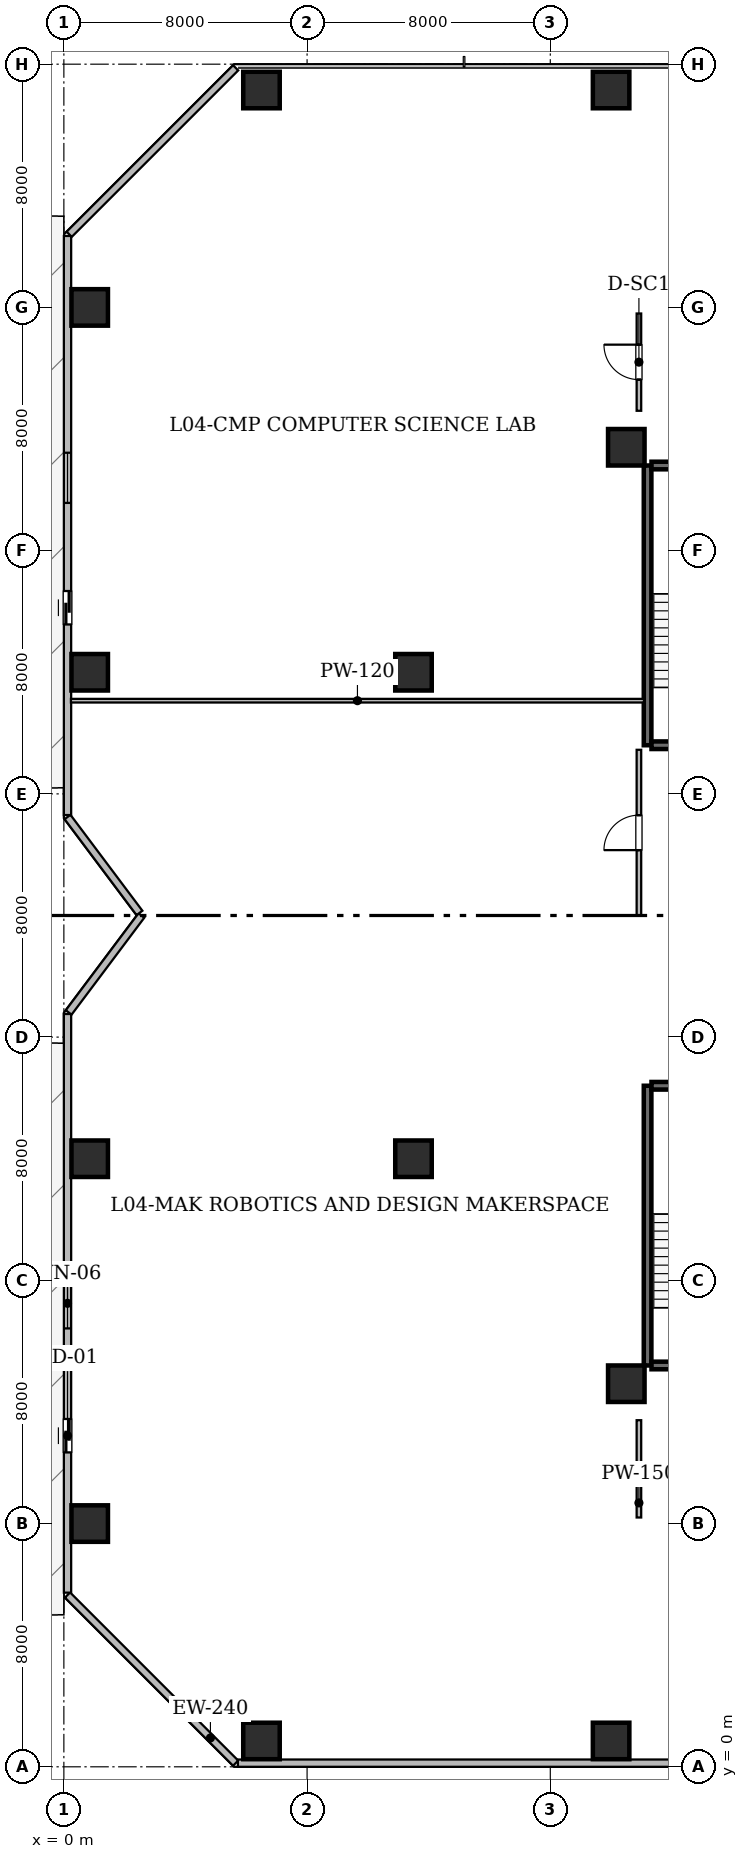
"""IFC4 building model, lengths in metres.
Left out: names, types, materials, properties, quantities, classifications, styles, units other than length and angle.
Written with IfcOpenShell. Run it as: python <this file> out.ifc"""

import sys

from ifc_helpers import new_model, si_unit, direction, frame, frame_2d, origin, origin_2d, place, context, subcontext, project, spatial, rectangle, hollow_rectangle, extrude, element, fill, save


model = new_model("IFC4")
c1 = context("Model", 3, precision=1e-05, world=origin(), true_north=direction((0.0, 1.0)))
c2 = subcontext(c1, "Body", "Model", "MODEL_VIEW")
j1 = project(units=[si_unit("LENGTHUNIT", "METRE"), si_unit("PLANEANGLEUNIT", "RADIAN")], contexts=[c1])
p1 = place(None, origin())
s1 = spatial("IfcSite", under=j1, at=p1, CompositionType="ELEMENT")
p2 = place(p1, origin())
s2 = spatial("IfcBuilding", under=s1, at=p2, CompositionType="ELEMENT")
p3 = place(p2, frame((0.0, 0.0, 20.4)))
s3 = spatial("IfcBuildingStorey", under=s2, at=p3, CompositionType="ELEMENT", Elevation=20.4)
for number, where, z_axis, x_axis in (
    (1, (6.5, 0.85, 0.0), (0.0, 0.0, 1.0), (1.0, 0.0, 0.0)),
    (2, (18.0, 0.85, 0.0), (0.0, 0.0, 1.0), (1.0, 0.0, 0.0)),
    (3, (6.5, 55.15, 0.0), (0.0, 0.0, 1.0), (1.0, 0.0, 0.0)),
    (4, (18.0, 55.15, 0.0), (0.0, 0.0, 1.0), (1.0, 0.0, 0.0)),
    (5, (0.85, 8.0, 0.0), (0.0, 0.0, 1.0), (1.0, 0.0, 0.0)),
    (6, (0.85, 20.0, 0.0), (0.0, 0.0, 1.0), (1.0, 0.0, 0.0)),
    (7, (0.85, 36.0, 0.0), (0.0, 0.0, 1.0), (1.0, 0.0, 0.0)),
    (8, (0.85, 48.0, 0.0), (0.0, 0.0, 1.0), (1.0, 0.0, 0.0)),
    (9, (18.5, 12.6, 0.0), (0.0, 0.0, 1.0), (1.0, 0.0, 0.0)),
    (10, (18.5, 43.4, 0.0), (0.0, 0.0, 1.0), (1.0, 0.0, 0.0)),
    (11, (11.5, 20.0, 0.0), (0.0, 0.0, 1.0), (1.0, 0.0, 0.0)),
    (12, (11.5, 36.0, 0.0), (0.0, 0.0, 1.0), (1.0, 0.0, 0.0)),
):
    element("IfcColumn", number, at=place(p3, frame(where, z_axis=z_axis, x_axis=x_axis)), inside=s3, PredefinedType="COLUMN", context=c2, shape_type="SweptSolid", body=[
        extrude(hollow_rectangle(XDim=1.2, YDim=1.2, WallThickness=0.06, at=origin_2d()), origin(), (0.0, 0.0, 1.0), 4.2),
    ])
p4 = place(p3, frame((5.65, 0.12, 0.0), z_axis=(0.0, 0.0, 1.0), x_axis=(-0.707106781187, 0.707106781187, 0.0)))
e13 = element("IfcWall", 13, at=p4, inside=s3, PredefinedType="STANDARD", context=c2, shape_type="SweptSolid", body=[
    extrude(rectangle(XDim=7.82, YDim=0.24, at=frame_2d((3.91, 0.0))), origin(), (0.0, 0.0, 1.0), 3.92),
])
p5 = place(p3, frame((0.12, 5.728, 0.0), z_axis=(0.0, 0.0, 1.0), x_axis=(0.0, 1.0, 0.0)))
e14 = element("IfcWall", 14, at=p5, inside=s3, PredefinedType="STANDARD", context=c2, shape_type="SweptSolid", body=[
    extrude(rectangle(XDim=19.032, YDim=0.24, at=frame_2d((9.516, 0.0))), origin(), (0.0, 0.0, 1.0), 3.92),
])
p6 = place(p5, frame((4.612, 0.0, 0.0)))
e15 = element("IfcOpeningElement", 15, at=p6, cuts=e14, PredefinedType="OPENING", context=c2, shape_type="SweptSolid", body=[
    extrude(rectangle(XDim=1.1, YDim=2.2, at=frame_2d((0.55, 1.1))), frame((0.0, 0.13, 0.0), z_axis=(0.0, -1.0, 0.0), x_axis=(1.0, 0.0, 0.0)), (0.0, 0.0, 1.0), 0.26),
])
p7 = place(p5, frame((8.691, 0.0, 0.85)))
e16 = element("IfcOpeningElement", 16, at=p7, cuts=e14, PredefinedType="OPENING", context=c2, shape_type="SweptSolid", body=[
    extrude(rectangle(XDim=1.65, YDim=1.55, at=frame_2d((0.825, 0.775))), frame((0.0, 0.13, 0.0), z_axis=(0.0, -1.0, 0.0), x_axis=(1.0, 0.0, 0.0)), (0.0, 0.0, 1.0), 0.26),
])
p8 = place(p3, frame((0.158, 24.811, 0.0), z_axis=(0.0, 0.0, 1.0), x_axis=(0.600058791648, 0.799955902889, 0.0)))
e17 = element("IfcWall", 17, at=p8, inside=s3, PredefinedType="STANDARD", context=c2, shape_type="SweptSolid", body=[
    extrude(rectangle(XDim=3.986, YDim=0.24, at=frame_2d((1.993, 0.0))), origin(), (0.0, 0.0, 1.0), 3.92),
])
p9 = place(p3, frame((2.487, 28.084, 0.0), z_axis=(0.0, 0.0, 1.0), x_axis=(-0.599990098106, 0.800007426325, 0.0)))
e18 = element("IfcWall", 18, at=p9, inside=s3, PredefinedType="STANDARD", context=c2, shape_type="SweptSolid", body=[
    extrude(rectangle(XDim=3.945, YDim=0.24, at=frame_2d((1.973, 0.0))), origin(), (0.0, 0.0, 1.0), 3.92),
])
p10 = place(p3, frame((0.12, 31.304, 0.0), z_axis=(0.0, 0.0, 1.0), x_axis=(0.0, 1.0, 0.0)))
e19 = element("IfcWall", 19, at=p10, inside=s3, PredefinedType="STANDARD", context=c2, shape_type="SweptSolid", body=[
    extrude(rectangle(XDim=19.046, YDim=0.24, at=frame_2d((9.523, 0.0))), origin(), (0.0, 0.0, 1.0), 3.92),
])
p11 = place(p10, frame((6.268, 0.0, 0.0)))
e20 = element("IfcOpeningElement", 20, at=p11, cuts=e19, PredefinedType="OPENING", context=c2, shape_type="SweptSolid", body=[
    extrude(rectangle(XDim=1.1, YDim=2.2, at=frame_2d((0.55, 1.1))), frame((0.0, 0.13, 0.0), z_axis=(0.0, -1.0, 0.0), x_axis=(1.0, 0.0, 0.0)), (0.0, 0.0, 1.0), 0.26),
])
p12 = place(p10, frame((10.266, 0.0, 0.85)))
e21 = element("IfcOpeningElement", 21, at=p12, cuts=e19, PredefinedType="OPENING", context=c2, shape_type="SweptSolid", body=[
    extrude(rectangle(XDim=1.65, YDim=1.55, at=frame_2d((0.825, 0.775))), frame((0.0, 0.13, 0.0), z_axis=(0.0, -1.0, 0.0), x_axis=(1.0, 0.0, 0.0)), (0.0, 0.0, 1.0), 0.26),
])
p13 = place(p3, frame((0.175, 50.405, 0.0), z_axis=(0.0, 0.0, 1.0), x_axis=(0.707106781187, 0.707106781187, 0.0)))
e22 = element("IfcWall", 22, at=p13, inside=s3, PredefinedType="STANDARD", context=c2, shape_type="SweptSolid", body=[
    extrude(rectangle(XDim=7.743, YDim=0.24, at=frame_2d((3.871, 0.0))), origin(), (0.0, 0.0, 1.0), 3.92),
])
p14 = place(p3, frame((50.275, 0.12, 0.0), z_axis=(0.0, 0.0, 1.0), x_axis=(-1.0, 0.0, 0.0)))
e23 = element("IfcWall", 23, at=p14, inside=s3, PredefinedType="STANDARD", context=c2, shape_type="SweptSolid", body=[
    extrude(rectangle(XDim=44.55, YDim=0.24, at=frame_2d((22.275, 0.0))), origin(), (0.0, 0.0, 1.0), 3.92),
])
p15 = place(p14, frame((15.35, 0.0, 0.85)))
e24 = element("IfcOpeningElement", 24, at=p15, cuts=e23, PredefinedType="OPENING", context=c2, shape_type="SweptSolid", body=[
    extrude(rectangle(XDim=1.65, YDim=1.55, at=frame_2d((0.825, 0.775))), frame((0.0, 0.13, 0.0), z_axis=(0.0, -1.0, 0.0), x_axis=(1.0, 0.0, 0.0)), (0.0, 0.0, 1.0), 0.26),
])
p16 = place(p3, frame((19.2, 13.2, 0.0), z_axis=(0.0, 0.0, 1.0), x_axis=(0.0, 1.0, 0.0)))
e25 = element("IfcWall", 25, at=p16, inside=s3, PredefinedType="SHEAR", context=c2, shape_type="SweptSolid", body=[
    extrude(rectangle(XDim=9.2, YDim=0.25, at=frame_2d((4.6, 0.0))), origin(), (0.0, 0.0, 1.0), 3.92),
])
for number, where, z_axis, x_axis in (
    (26, (19.329, 13.2, 0.0), (0.0, 0.0, 1.0), (1.0, 0.0, 0.0)),
    (27, (19.329, 22.4, 0.0), (0.0, 0.0, 1.0), (1.0, 0.0, 0.0)),
):
    element("IfcWall", number, at=place(p3, frame(where, z_axis=z_axis, x_axis=x_axis)), inside=s3, PredefinedType="SHEAR", context=c2, shape_type="SweptSolid", body=[
        extrude(rectangle(XDim=3.692, YDim=0.25, at=frame_2d((1.846, 0.0))), origin(), (0.0, 0.0, 1.0), 3.92),
    ])
p17 = place(p3, frame((19.2, 33.6, 0.0), z_axis=(0.0, 0.0, 1.0), x_axis=(0.0, 1.0, 0.0)))
e28 = element("IfcWall", 28, at=p17, inside=s3, PredefinedType="SHEAR", context=c2, shape_type="SweptSolid", body=[
    extrude(rectangle(XDim=9.2, YDim=0.25, at=frame_2d((4.6, 0.0))), origin(), (0.0, 0.0, 1.0), 3.92),
])
for number, where, z_axis, x_axis in (
    (29, (19.329, 33.6, 0.0), (0.0, 0.0, 1.0), (1.0, 0.0, 0.0)),
    (30, (19.329, 42.8, 0.0), (0.0, 0.0, 1.0), (1.0, 0.0, 0.0)),
):
    element("IfcWall", number, at=place(p3, frame(where, z_axis=z_axis, x_axis=x_axis)), inside=s3, PredefinedType="SHEAR", context=c2, shape_type="SweptSolid", body=[
        extrude(rectangle(XDim=3.692, YDim=0.25, at=frame_2d((1.846, 0.0))), origin(), (0.0, 0.0, 1.0), 3.92),
    ])
p18 = place(p3, frame((18.915, 28.0, 0.0), z_axis=(0.0, 0.0, 1.0), x_axis=(0.0, 1.0, 0.0)))
e31 = element("IfcWall", 31, at=p18, inside=s3, PredefinedType="STANDARD", context=c2, shape_type="SweptSolid", body=[
    extrude(rectangle(XDim=5.45, YDim=0.15, at=frame_2d((2.725, 0.0))), origin(), (0.0, 0.0, 1.0), 3.92),
])
p19 = place(p18, frame((2.15, 0.0, 0.0)))
e32 = element("IfcOpeningElement", 32, at=p19, cuts=e31, PredefinedType="OPENING", context=c2, shape_type="SweptSolid", body=[
    extrude(rectangle(XDim=1.15, YDim=2.2, at=frame_2d((0.575, 1.1))), frame((0.0, 0.085, 0.0), z_axis=(0.0, -1.0, 0.0), x_axis=(1.0, 0.0, 0.0)), (0.0, 0.0, 1.0), 0.17),
])
p20 = place(p3, frame((18.915, 8.2, 0.0), z_axis=(0.0, 0.0, 1.0), x_axis=(0.0, 1.0, 0.0)))
e33 = element("IfcWall", 33, at=p20, inside=s3, PredefinedType="STANDARD", context=c2, shape_type="SweptSolid", body=[
    extrude(rectangle(XDim=3.2, YDim=0.15, at=frame_2d((1.6, 0.0))), origin(), (0.0, 0.0, 1.0), 3.92),
])
p21 = place(p3, frame((18.915, 44.6, 0.0), z_axis=(0.0, 0.0, 1.0), x_axis=(0.0, 1.0, 0.0)))
e34 = element("IfcWall", 34, at=p21, inside=s3, PredefinedType="STANDARD", context=c2, shape_type="SweptSolid", body=[
    extrude(rectangle(XDim=3.2, YDim=0.15, at=frame_2d((1.6, 0.0))), origin(), (0.0, 0.0, 1.0), 3.92),
])
p22 = place(p21, frame((1.025, 0.0, 0.0)))
e35 = element("IfcOpeningElement", 35, at=p22, cuts=e34, PredefinedType="OPENING", context=c2, shape_type="SweptSolid", body=[
    extrude(rectangle(XDim=1.15, YDim=2.2, at=frame_2d((0.575, 1.1))), frame((0.0, 0.085, 0.0), z_axis=(0.0, -1.0, 0.0), x_axis=(1.0, 0.0, 0.0)), (0.0, 0.0, 1.0), 0.17),
])
p23 = place(p3, frame((0.232, 35.065, 0.0), z_axis=(0.0, 0.0, 1.0), x_axis=(1.0, 0.0, 0.0)))
e36 = element("IfcWall", 36, at=p23, inside=s3, PredefinedType="PARTITIONING", context=c2, shape_type="SweptSolid", body=[
    extrude(rectangle(XDim=18.849, YDim=0.12, at=frame_2d((9.425, 0.0))), origin(), (0.0, 0.0, 1.0), 3.055),
])
p24 = place(p6, origin())
e37 = element("IfcDoor", 37, at=p24, inside=s3, OperationType="SLIDING_TO_LEFT", PredefinedType="DOOR", context=c2, shape_type="SweptSolid", body=[
    extrude(rectangle(XDim=1.1, YDim=2.2, at=frame_2d((0.55, 1.1))), frame((0.0, 0.025, 0.0), z_axis=(0.0, -1.0, 0.0), x_axis=(1.0, 0.0, 0.0)), (0.0, 0.0, 1.0), 0.05),
])
fill(e15, e37)
p25 = place(p11, origin())
e38 = element("IfcDoor", 38, at=p25, inside=s3, OperationType="SLIDING_TO_LEFT", PredefinedType="DOOR", context=c2, shape_type="SweptSolid", body=[
    extrude(rectangle(XDim=1.1, YDim=2.2, at=frame_2d((0.55, 1.1))), frame((0.0, 0.025, 0.0), z_axis=(0.0, -1.0, 0.0), x_axis=(1.0, 0.0, 0.0)), (0.0, 0.0, 1.0), 0.05),
])
fill(e20, e38)
p26 = place(p7, origin())
e39 = element("IfcWindow", 39, at=p26, inside=s3, PartitioningType="SINGLE_PANEL", PredefinedType="WINDOW", context=c2, shape_type="SweptSolid", body=[
    extrude(rectangle(XDim=1.65, YDim=1.55, at=frame_2d((0.825, 0.775))), frame((0.0, 0.03, 0.0), z_axis=(0.0, -1.0, 0.0), x_axis=(1.0, 0.0, 0.0)), (0.0, 0.0, 1.0), 0.06),
])
fill(e16, e39)
p27 = place(p12, origin())
e40 = element("IfcWindow", 40, at=p27, inside=s3, PartitioningType="SINGLE_PANEL", PredefinedType="WINDOW", context=c2, shape_type="SweptSolid", body=[
    extrude(rectangle(XDim=1.65, YDim=1.55, at=frame_2d((0.825, 0.775))), frame((0.0, 0.03, 0.0), z_axis=(0.0, -1.0, 0.0), x_axis=(1.0, 0.0, 0.0)), (0.0, 0.0, 1.0), 0.06),
])
fill(e21, e40)
p28 = place(p19, origin())
e41 = element("IfcDoor", 41, at=p28, inside=s3, OperationType="SINGLE_SWING_LEFT", PredefinedType="DOOR", context=c2, shape_type="SweptSolid", body=[
    extrude(rectangle(XDim=1.15, YDim=2.2, at=frame_2d((0.575, 1.1))), frame((0.0, 0.025, 0.0), z_axis=(0.0, -1.0, 0.0), x_axis=(1.0, 0.0, 0.0)), (0.0, 0.0, 1.0), 0.05),
])
fill(e32, e41)
p29 = place(p22, origin())
e42 = element("IfcDoor", 42, at=p29, inside=s3, OperationType="SINGLE_SWING_RIGHT", PredefinedType="DOOR", context=c2, shape_type="SweptSolid", body=[
    extrude(rectangle(XDim=1.15, YDim=2.2, at=frame_2d((0.575, 1.1))), frame((0.0, 0.025, 0.0), z_axis=(0.0, -1.0, 0.0), x_axis=(1.0, 0.0, 0.0)), (0.0, 0.0, 1.0), 0.05),
])
fill(e35, e42)
save(model, sys.argv[1])
